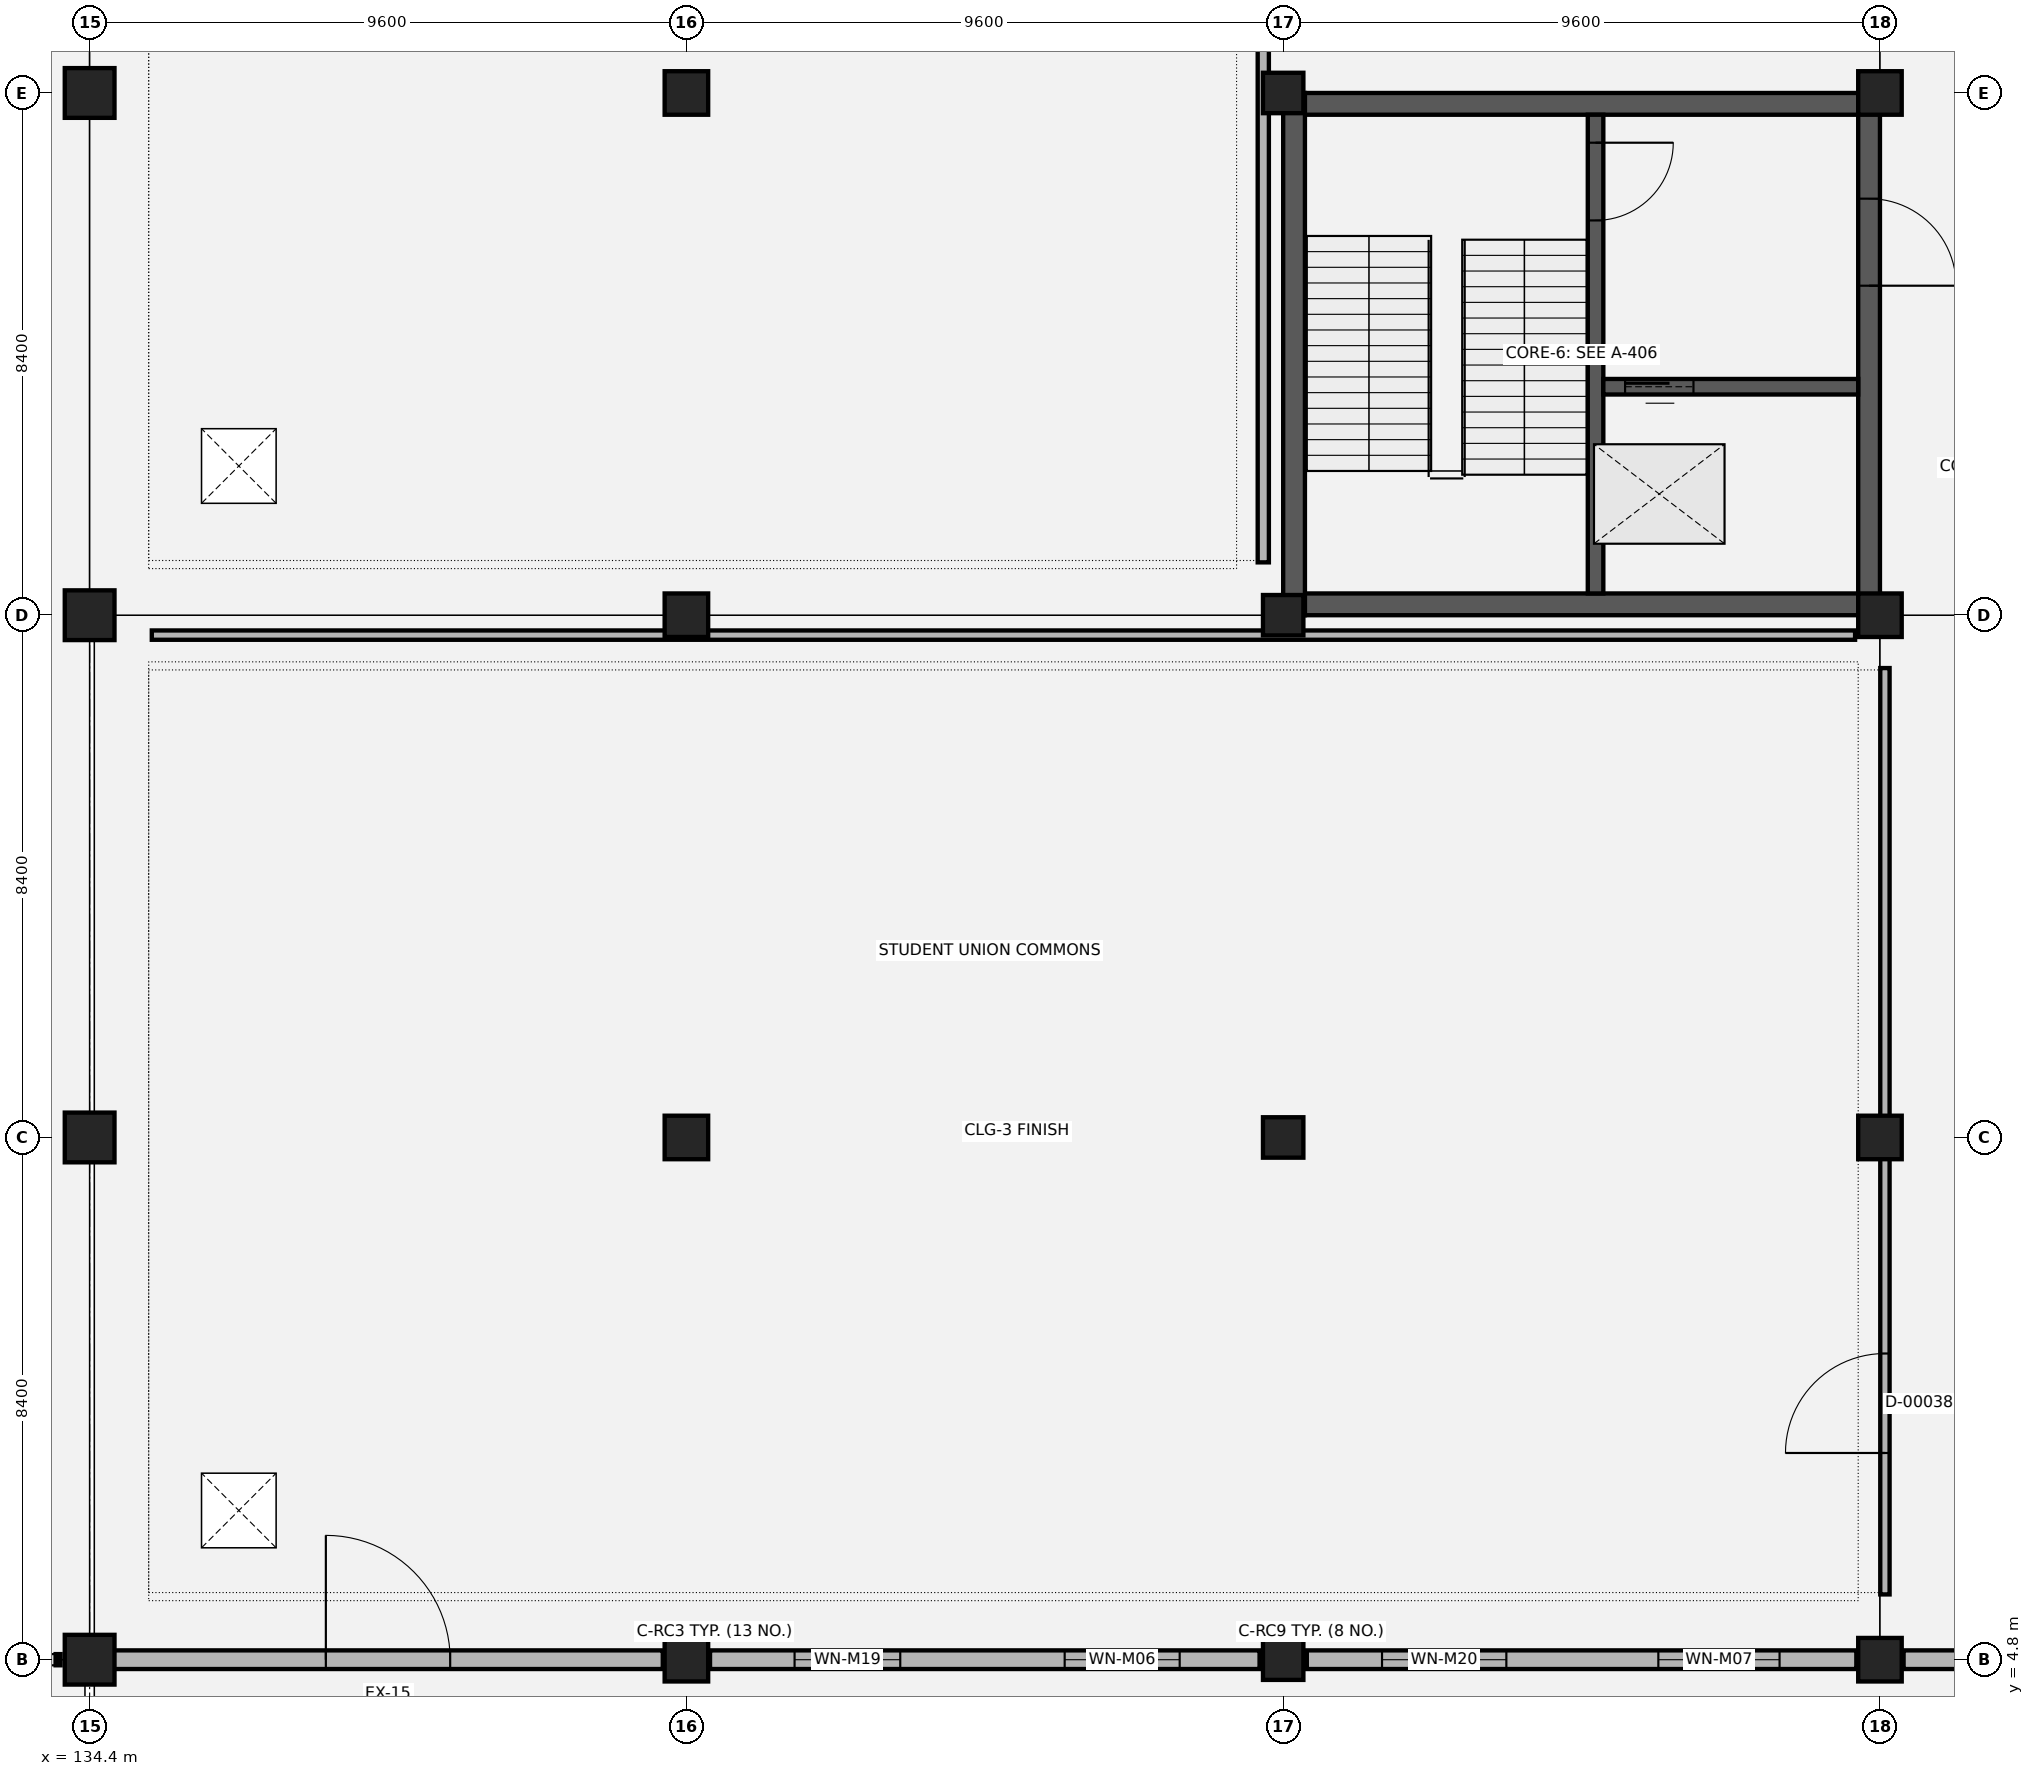
"""IFC4 building model, lengths in metres.
Left out: names, types, materials, properties, quantities, classifications, styles, units other than length and angle.
Written with IfcOpenShell. Run it as: python <this file> out.ifc"""

import sys

from ifc_helpers import new_model, si_unit, direction, frame, frame_2d, origin, origin_2d, place, context, subcontext, project, spatial, rectangle, extrude, element, fill, save


model = new_model("IFC4")
c1 = context("Model", 3, precision=1e-05, world=origin(), true_north=direction((0.0, 1.0)))
c2 = subcontext(c1, "Body", "Model", "MODEL_VIEW")
j1 = project(units=[si_unit("LENGTHUNIT", "METRE"), si_unit("PLANEANGLEUNIT", "RADIAN")], contexts=[c1])
p1 = place(None, origin())
s1 = spatial("IfcSite", under=j1, at=p1, CompositionType="ELEMENT")
p2 = place(p1, origin())
s2 = spatial("IfcBuilding", under=s1, at=p2, CompositionType="ELEMENT")
p3 = place(p2, origin())
s3 = spatial("IfcBuildingStorey", under=s2, at=p3, CompositionType="ELEMENT", Elevation=0.0)
for number, where, z_axis, x_axis in (
    (1, (134.4, 4.8, 0.0), (0.0, 0.0, 1.0), (1.0, 0.0, 0.0)),
    (2, (134.4, 13.2, 0.0), (0.0, 0.0, 1.0), (1.0, 0.0, 0.0)),
    (3, (134.4, 21.6, 0.0), (0.0, 0.0, 1.0), (1.0, 0.0, 0.0)),
    (4, (134.4, 30.0, 0.0), (0.0, 0.0, 1.0), (1.0, 0.0, 0.0)),
):
    element("IfcColumn", number, at=place(p3, frame(where, z_axis=z_axis, x_axis=x_axis)), inside=s3, PredefinedType="COLUMN", context=c2, shape_type="SweptSolid", body=[
        extrude(rectangle(XDim=0.8, YDim=0.8, at=origin_2d()), origin(), (0.0, 0.0, 1.0), 5.4),
    ])
for number, where, z_axis, x_axis in (
    (5, (144.0, 4.8, 0.0), (0.0, 0.0, 1.0), (1.0, 0.0, 0.0)),
    (6, (144.0, 13.2, 0.0), (0.0, 0.0, 1.0), (1.0, 0.0, 0.0)),
    (7, (144.0, 21.6, 0.0), (0.0, 0.0, 1.0), (1.0, 0.0, 0.0)),
    (8, (144.0, 30.0, 0.0), (0.0, 0.0, 1.0), (1.0, 0.0, 0.0)),
):
    element("IfcColumn", number, at=place(p3, frame(where, z_axis=z_axis, x_axis=x_axis)), inside=s3, PredefinedType="COLUMN", context=c2, shape_type="SweptSolid", body=[
        extrude(rectangle(XDim=0.7, YDim=0.7, at=origin_2d()), origin(), (0.0, 0.0, 1.0), 5.4),
    ])
for number, where, z_axis, x_axis in (
    (9, (153.6, 4.8, 0.0), (0.0, 0.0, 1.0), (1.0, 0.0, 0.0)),
    (10, (153.6, 13.2, 0.0), (0.0, 0.0, 1.0), (1.0, 0.0, 0.0)),
    (11, (153.6, 21.6, 0.0), (0.0, 0.0, 1.0), (1.0, 0.0, 0.0)),
    (12, (153.6, 30.0, 0.0), (0.0, 0.0, 1.0), (1.0, 0.0, 0.0)),
):
    element("IfcColumn", number, at=place(p3, frame(where, z_axis=z_axis, x_axis=x_axis)), inside=s3, PredefinedType="COLUMN", context=c2, shape_type="SweptSolid", body=[
        extrude(rectangle(XDim=0.65, YDim=0.65, at=origin_2d()), origin(), (0.0, 0.0, 1.0), 5.4),
    ])
for number, where, z_axis, x_axis in (
    (13, (163.2, 4.8, 0.0), (0.0, 0.0, 1.0), (1.0, 0.0, 0.0)),
    (14, (163.2, 13.2, 0.0), (0.0, 0.0, 1.0), (1.0, 0.0, 0.0)),
    (15, (163.2, 21.6, 0.0), (0.0, 0.0, 1.0), (1.0, 0.0, 0.0)),
    (16, (163.2, 30.0, 0.0), (0.0, 0.0, 1.0), (1.0, 0.0, 0.0)),
):
    element("IfcColumn", number, at=place(p3, frame(where, z_axis=z_axis, x_axis=x_axis)), inside=s3, PredefinedType="COLUMN", context=c2, shape_type="SweptSolid", body=[
        extrude(rectangle(XDim=0.7, YDim=0.7, at=origin_2d()), origin(), (0.0, 0.0, 1.0), 5.4),
    ])
p4 = place(p3, frame((134.78, 4.8, 0.0), z_axis=(0.0, 0.0, 1.0), x_axis=(1.0, 0.0, 0.0)))
e17 = element("IfcWall", 17, at=p4, inside=s3, PredefinedType="SOLIDWALL", context=c2, shape_type="SweptSolid", body=[
    extrude(rectangle(XDim=8.84, YDim=0.3, at=frame_2d((4.42, 0.0))), origin(), (0.0, 0.0, 1.0), 4.04),
])
p5 = place(p4, frame((3.42, 0.0, 0.0)))
e18 = element("IfcOpeningElement", 18, at=p5, cuts=e17, PredefinedType="OPENING", context=c2, shape_type="SweptSolid", body=[
    extrude(rectangle(XDim=2.0, YDim=2.2, at=frame_2d((1.0, 1.1))), frame((0.0, 0.16, 0.0), z_axis=(0.0, -1.0, 0.0), x_axis=(1.0, 0.0, 0.0)), (0.0, 0.0, 1.0), 0.32),
])
p6 = place(p3, frame((144.38, 4.8, 0.0), z_axis=(0.0, 0.0, 1.0), x_axis=(1.0, 0.0, 0.0)))
e19 = element("IfcWall", 19, at=p6, inside=s3, PredefinedType="SOLIDWALL", context=c2, shape_type="SweptSolid", body=[
    extrude(rectangle(XDim=8.84, YDim=0.3, at=frame_2d((4.42, 0.0))), origin(), (0.0, 0.0, 1.0), 4.04),
])
p7 = place(p6, frame((1.36, 0.0, 0.9)))
e20 = element("IfcOpeningElement", 20, at=p7, cuts=e19, PredefinedType="OPENING", context=c2, shape_type="SweptSolid", body=[
    extrude(rectangle(XDim=1.7, YDim=1.45, at=frame_2d((0.85, 0.725))), frame((0.0, 0.16, 0.0), z_axis=(0.0, -1.0, 0.0), x_axis=(1.0, 0.0, 0.0)), (0.0, 0.0, 1.0), 0.32),
])
p8 = place(p6, frame((5.705, 0.0, 0.9)))
e21 = element("IfcOpeningElement", 21, at=p8, cuts=e19, PredefinedType="OPENING", context=c2, shape_type="SweptSolid", body=[
    extrude(rectangle(XDim=1.85, YDim=1.55, at=frame_2d((0.925, 0.775))), frame((0.0, 0.16, 0.0), z_axis=(0.0, -1.0, 0.0), x_axis=(1.0, 0.0, 0.0)), (0.0, 0.0, 1.0), 0.32),
])
p9 = place(p3, frame((153.98, 4.8, 0.0), z_axis=(0.0, 0.0, 1.0), x_axis=(1.0, 0.0, 0.0)))
e22 = element("IfcWall", 22, at=p9, inside=s3, PredefinedType="SOLIDWALL", context=c2, shape_type="SweptSolid", body=[
    extrude(rectangle(XDim=8.84, YDim=0.3, at=frame_2d((4.42, 0.0))), origin(), (0.0, 0.0, 1.0), 4.04),
])
p10 = place(p9, frame((1.21, 0.0, 0.9)))
e23 = element("IfcOpeningElement", 23, at=p10, cuts=e22, PredefinedType="OPENING", context=c2, shape_type="SweptSolid", body=[
    extrude(rectangle(XDim=2.0, YDim=1.55, at=frame_2d((1.0, 0.775))), frame((0.0, 0.16, 0.0), z_axis=(0.0, -1.0, 0.0), x_axis=(1.0, 0.0, 0.0)), (0.0, 0.0, 1.0), 0.32),
])
p11 = place(p9, frame((5.655, 0.0, 0.9)))
e24 = element("IfcOpeningElement", 24, at=p11, cuts=e22, PredefinedType="OPENING", context=c2, shape_type="SweptSolid", body=[
    extrude(rectangle(XDim=1.95, YDim=1.6, at=frame_2d((0.975, 0.8))), frame((0.0, 0.16, 0.0), z_axis=(0.0, -1.0, 0.0), x_axis=(1.0, 0.0, 0.0)), (0.0, 0.0, 1.0), 0.32),
])
p12 = place(p3, frame((163.58, 4.8, 0.0), z_axis=(0.0, 0.0, 1.0), x_axis=(1.0, 0.0, 0.0)))
e25 = element("IfcWall", 25, at=p12, inside=s3, PredefinedType="SOLIDWALL", context=c2, shape_type="SweptSolid", body=[
    extrude(rectangle(XDim=8.84, YDim=0.3, at=frame_2d((4.42, 0.0))), origin(), (0.0, 0.0, 1.0), 4.04),
])
p13 = place(p12, frame((3.37, 0.0, 0.0)))
e26 = element("IfcOpeningElement", 26, at=p13, cuts=e25, PredefinedType="OPENING", context=c2, shape_type="SweptSolid", body=[
    extrude(rectangle(XDim=2.1, YDim=2.2, at=frame_2d((1.05, 1.1))), frame((0.0, 0.16, 0.0), z_axis=(0.0, -1.0, 0.0), x_axis=(1.0, 0.0, 0.0)), (0.0, 0.0, 1.0), 0.32),
])
for number, where, z_axis, x_axis in (
    (27, (153.6, 29.825, 0.0), (0.0, 0.0, 1.0), (1.0, 0.0, 0.0)),
    (28, (153.6, 21.775, 0.0), (0.0, 0.0, 1.0), (1.0, 0.0, 0.0)),
):
    element("IfcWall", number, at=place(p3, frame(where, z_axis=z_axis, x_axis=x_axis)), inside=s3, PredefinedType="SHEAR", context=c2, shape_type="SweptSolid", body=[
        extrude(rectangle(XDim=9.6, YDim=0.35, at=frame_2d((4.8, 0.0))), origin(), (0.0, 0.0, 1.0), 5.11),
    ])
p14 = place(p3, frame((153.775, 21.6, 0.0), z_axis=(0.0, 0.0, 1.0), x_axis=(0.0, 1.0, 0.0)))
e29 = element("IfcWall", 29, at=p14, inside=s3, PredefinedType="SHEAR", context=c2, shape_type="SweptSolid", body=[
    extrude(rectangle(XDim=8.4, YDim=0.35, at=frame_2d((4.2, 0.0))), origin(), (0.0, 0.0, 1.0), 5.11),
])
p15 = place(p3, frame((163.025, 21.6, 0.0), z_axis=(0.0, 0.0, 1.0), x_axis=(0.0, 1.0, 0.0)))
e30 = element("IfcWall", 30, at=p15, inside=s3, PredefinedType="SHEAR", context=c2, shape_type="SweptSolid", body=[
    extrude(rectangle(XDim=8.4, YDim=0.35, at=frame_2d((4.2, 0.0))), origin(), (0.0, 0.0, 1.0), 5.11),
])
p16 = place(p15, frame((5.3, 0.0, 0.0)))
e31 = element("IfcOpeningElement", 31, at=p16, cuts=e30, PredefinedType="OPENING", context=c2, shape_type="SweptSolid", body=[
    extrude(rectangle(XDim=1.4, YDim=2.15, at=frame_2d((0.7, 1.075))), frame((0.0, 0.185, 0.0), z_axis=(0.0, -1.0, 0.0), x_axis=(1.0, 0.0, 0.0)), (0.0, 0.0, 1.0), 0.37),
])
p17 = place(p3, frame((158.625, 29.65, 0.0), z_axis=(0.0, 0.0, 1.0), x_axis=(0.0, -1.0, 0.0)))
e32 = element("IfcWall", 32, at=p17, inside=s3, PredefinedType="SHEAR", context=c2, shape_type="SweptSolid", body=[
    extrude(rectangle(XDim=7.7, YDim=0.25, at=frame_2d((3.85, 0.0))), origin(), (0.0, 0.0, 1.0), 5.11),
])
p18 = place(p17, frame((0.45, 0.0, 0.0)))
e33 = element("IfcOpeningElement", 33, at=p18, cuts=e32, PredefinedType="OPENING", context=c2, shape_type="SweptSolid", body=[
    extrude(rectangle(XDim=1.25, YDim=2.15, at=frame_2d((0.625, 1.075))), frame((0.0, 0.135, 0.0), z_axis=(0.0, -1.0, 0.0), x_axis=(1.0, 0.0, 0.0)), (0.0, 0.0, 1.0), 0.27),
])
p19 = place(p3, frame((158.75, 25.275, 0.0), z_axis=(0.0, 0.0, 1.0), x_axis=(1.0, 0.0, 0.0)))
e34 = element("IfcWall", 34, at=p19, inside=s3, PredefinedType="SHEAR", context=c2, shape_type="SweptSolid", body=[
    extrude(rectangle(XDim=4.1, YDim=0.25, at=frame_2d((2.05, 0.0))), origin(), (0.0, 0.0, 1.0), 5.11),
])
p20 = place(p19, frame((0.35, 0.0, 0.0)))
e35 = element("IfcOpeningElement", 35, at=p20, cuts=e34, PredefinedType="OPENING", context=c2, shape_type="SweptSolid", body=[
    extrude(rectangle(XDim=1.1, YDim=2.15, at=frame_2d((0.55, 1.075))), frame((0.0, 0.135, 0.0), z_axis=(0.0, -1.0, 0.0), x_axis=(1.0, 0.0, 0.0)), (0.0, 0.0, 1.0), 0.27),
])
p21 = place(p3, frame((153.28, 22.45, 0.0), z_axis=(0.0, 0.0, 1.0), x_axis=(0.0, 1.0, 0.0)))
e36 = element("IfcWall", 36, at=p21, inside=s3, PredefinedType="PARTITIONING", context=c2, shape_type="SweptSolid", body=[
    extrude(rectangle(XDim=36.7, YDim=0.18, at=frame_2d((18.35, 0.0))), origin(), (0.0, 0.0, 1.0), 4.04),
])
p22 = place(p21, frame((24.305, 0.0, 0.0)))
e37 = element("IfcOpeningElement", 37, at=p22, cuts=e36, PredefinedType="OPENING", context=c2, shape_type="SweptSolid", body=[
    extrude(rectangle(XDim=1.75, YDim=2.15, at=frame_2d((0.875, 1.075))), frame((0.0, 0.1, 0.0), z_axis=(0.0, -1.0, 0.0), x_axis=(1.0, 0.0, 0.0)), (0.0, 0.0, 1.0), 0.2),
])
p23 = place(p3, frame((163.28, 5.85, 0.0), z_axis=(0.0, 0.0, 1.0), x_axis=(0.0, 1.0, 0.0)))
e38 = element("IfcWall", 38, at=p23, inside=s3, PredefinedType="PARTITIONING", context=c2, shape_type="SweptSolid", body=[
    extrude(rectangle(XDim=14.9, YDim=0.15, at=frame_2d((7.45, 0.0))), origin(), (0.0, 0.0, 1.0), 4.04),
])
p24 = place(p23, frame((2.275, 0.0, 0.0)))
e39 = element("IfcOpeningElement", 39, at=p24, cuts=e38, PredefinedType="OPENING", context=c2, shape_type="SweptSolid", body=[
    extrude(rectangle(XDim=1.6, YDim=2.15, at=frame_2d((0.8, 1.075))), frame((0.0, 0.085, 0.0), z_axis=(0.0, -1.0, 0.0), x_axis=(1.0, 0.0, 0.0)), (0.0, 0.0, 1.0), 0.17),
])
p25 = place(p3, frame((135.4, 21.28, 0.0), z_axis=(0.0, 0.0, 1.0), x_axis=(1.0, 0.0, 0.0)))
e40 = element("IfcWall", 40, at=p25, inside=s3, PredefinedType="PARTITIONING", context=c2, shape_type="SweptSolid", body=[
    extrude(rectangle(XDim=27.4, YDim=0.15, at=frame_2d((13.7, 0.0))), origin(), (0.0, 0.0, 1.0), 4.04),
])
p26 = place(p5, origin())
e41 = element("IfcDoor", 41, at=p26, inside=s3, OperationType="SINGLE_SWING_LEFT", PredefinedType="DOOR", context=c2, shape_type="SweptSolid", body=[
    extrude(rectangle(XDim=2.0, YDim=2.2, at=frame_2d((1.0, 1.1))), frame((0.0, 0.025, 0.0), z_axis=(0.0, -1.0, 0.0), x_axis=(1.0, 0.0, 0.0)), (0.0, 0.0, 1.0), 0.05),
])
fill(e18, e41)
p27 = place(p7, origin())
e42 = element("IfcWindow", 42, at=p27, inside=s3, PartitioningType="SINGLE_PANEL", PredefinedType="WINDOW", context=c2, shape_type="SweptSolid", body=[
    extrude(rectangle(XDim=1.7, YDim=1.45, at=frame_2d((0.85, 0.725))), frame((0.0, 0.03, 0.0), z_axis=(0.0, -1.0, 0.0), x_axis=(1.0, 0.0, 0.0)), (0.0, 0.0, 1.0), 0.06),
])
fill(e20, e42)
p28 = place(p8, origin())
e43 = element("IfcWindow", 43, at=p28, inside=s3, PartitioningType="SINGLE_PANEL", PredefinedType="WINDOW", context=c2, shape_type="SweptSolid", body=[
    extrude(rectangle(XDim=1.85, YDim=1.55, at=frame_2d((0.925, 0.775))), frame((0.0, 0.03, 0.0), z_axis=(0.0, -1.0, 0.0), x_axis=(1.0, 0.0, 0.0)), (0.0, 0.0, 1.0), 0.06),
])
fill(e21, e43)
p29 = place(p10, origin())
e44 = element("IfcWindow", 44, at=p29, inside=s3, PartitioningType="SINGLE_PANEL", PredefinedType="WINDOW", context=c2, shape_type="SweptSolid", body=[
    extrude(rectangle(XDim=2.0, YDim=1.55, at=frame_2d((1.0, 0.775))), frame((0.0, 0.03, 0.0), z_axis=(0.0, -1.0, 0.0), x_axis=(1.0, 0.0, 0.0)), (0.0, 0.0, 1.0), 0.06),
])
fill(e23, e44)
p30 = place(p11, origin())
e45 = element("IfcWindow", 45, at=p30, inside=s3, PartitioningType="SINGLE_PANEL", PredefinedType="WINDOW", context=c2, shape_type="SweptSolid", body=[
    extrude(rectangle(XDim=1.95, YDim=1.6, at=frame_2d((0.975, 0.8))), frame((0.0, 0.03, 0.0), z_axis=(0.0, -1.0, 0.0), x_axis=(1.0, 0.0, 0.0)), (0.0, 0.0, 1.0), 0.06),
])
fill(e24, e45)
p31 = place(p18, origin())
e46 = element("IfcDoor", 46, at=p31, inside=s3, OperationType="SINGLE_SWING_LEFT", PredefinedType="DOOR", context=c2, shape_type="SweptSolid", body=[
    extrude(rectangle(XDim=1.25, YDim=2.15, at=frame_2d((0.625, 1.075))), frame((0.0, 0.025, 0.0), z_axis=(0.0, -1.0, 0.0), x_axis=(1.0, 0.0, 0.0)), (0.0, 0.0, 1.0), 0.05),
])
fill(e33, e46)
p32 = place(p20, origin())
e47 = element("IfcDoor", 47, at=p32, inside=s3, OperationType="SLIDING_TO_LEFT", PredefinedType="DOOR", context=c2, shape_type="SweptSolid", body=[
    extrude(rectangle(XDim=1.1, YDim=2.15, at=frame_2d((0.55, 1.075))), frame((0.0, 0.025, 0.0), z_axis=(0.0, -1.0, 0.0), x_axis=(1.0, 0.0, 0.0)), (0.0, 0.0, 1.0), 0.05),
])
fill(e35, e47)
p33 = place(p16, origin())
e48 = element("IfcDoor", 48, at=p33, inside=s3, OperationType="SINGLE_SWING_RIGHT", PredefinedType="DOOR", context=c2, shape_type="SweptSolid", body=[
    extrude(rectangle(XDim=1.4, YDim=2.15, at=frame_2d((0.7, 1.075))), frame((0.0, 0.025, 0.0), z_axis=(0.0, -1.0, 0.0), x_axis=(1.0, 0.0, 0.0)), (0.0, 0.0, 1.0), 0.05),
])
fill(e31, e48)
p34 = place(p24, origin())
e49 = element("IfcDoor", 49, at=p34, inside=s3, OperationType="SINGLE_SWING_LEFT", PredefinedType="DOOR", context=c2, shape_type="SweptSolid", body=[
    extrude(rectangle(XDim=1.6, YDim=2.15, at=frame_2d((0.8, 1.075))), frame((0.0, 0.025, 0.0), z_axis=(0.0, -1.0, 0.0), x_axis=(1.0, 0.0, 0.0)), (0.0, 0.0, 1.0), 0.05),
])
fill(e39, e49)
save(model, sys.argv[1])
